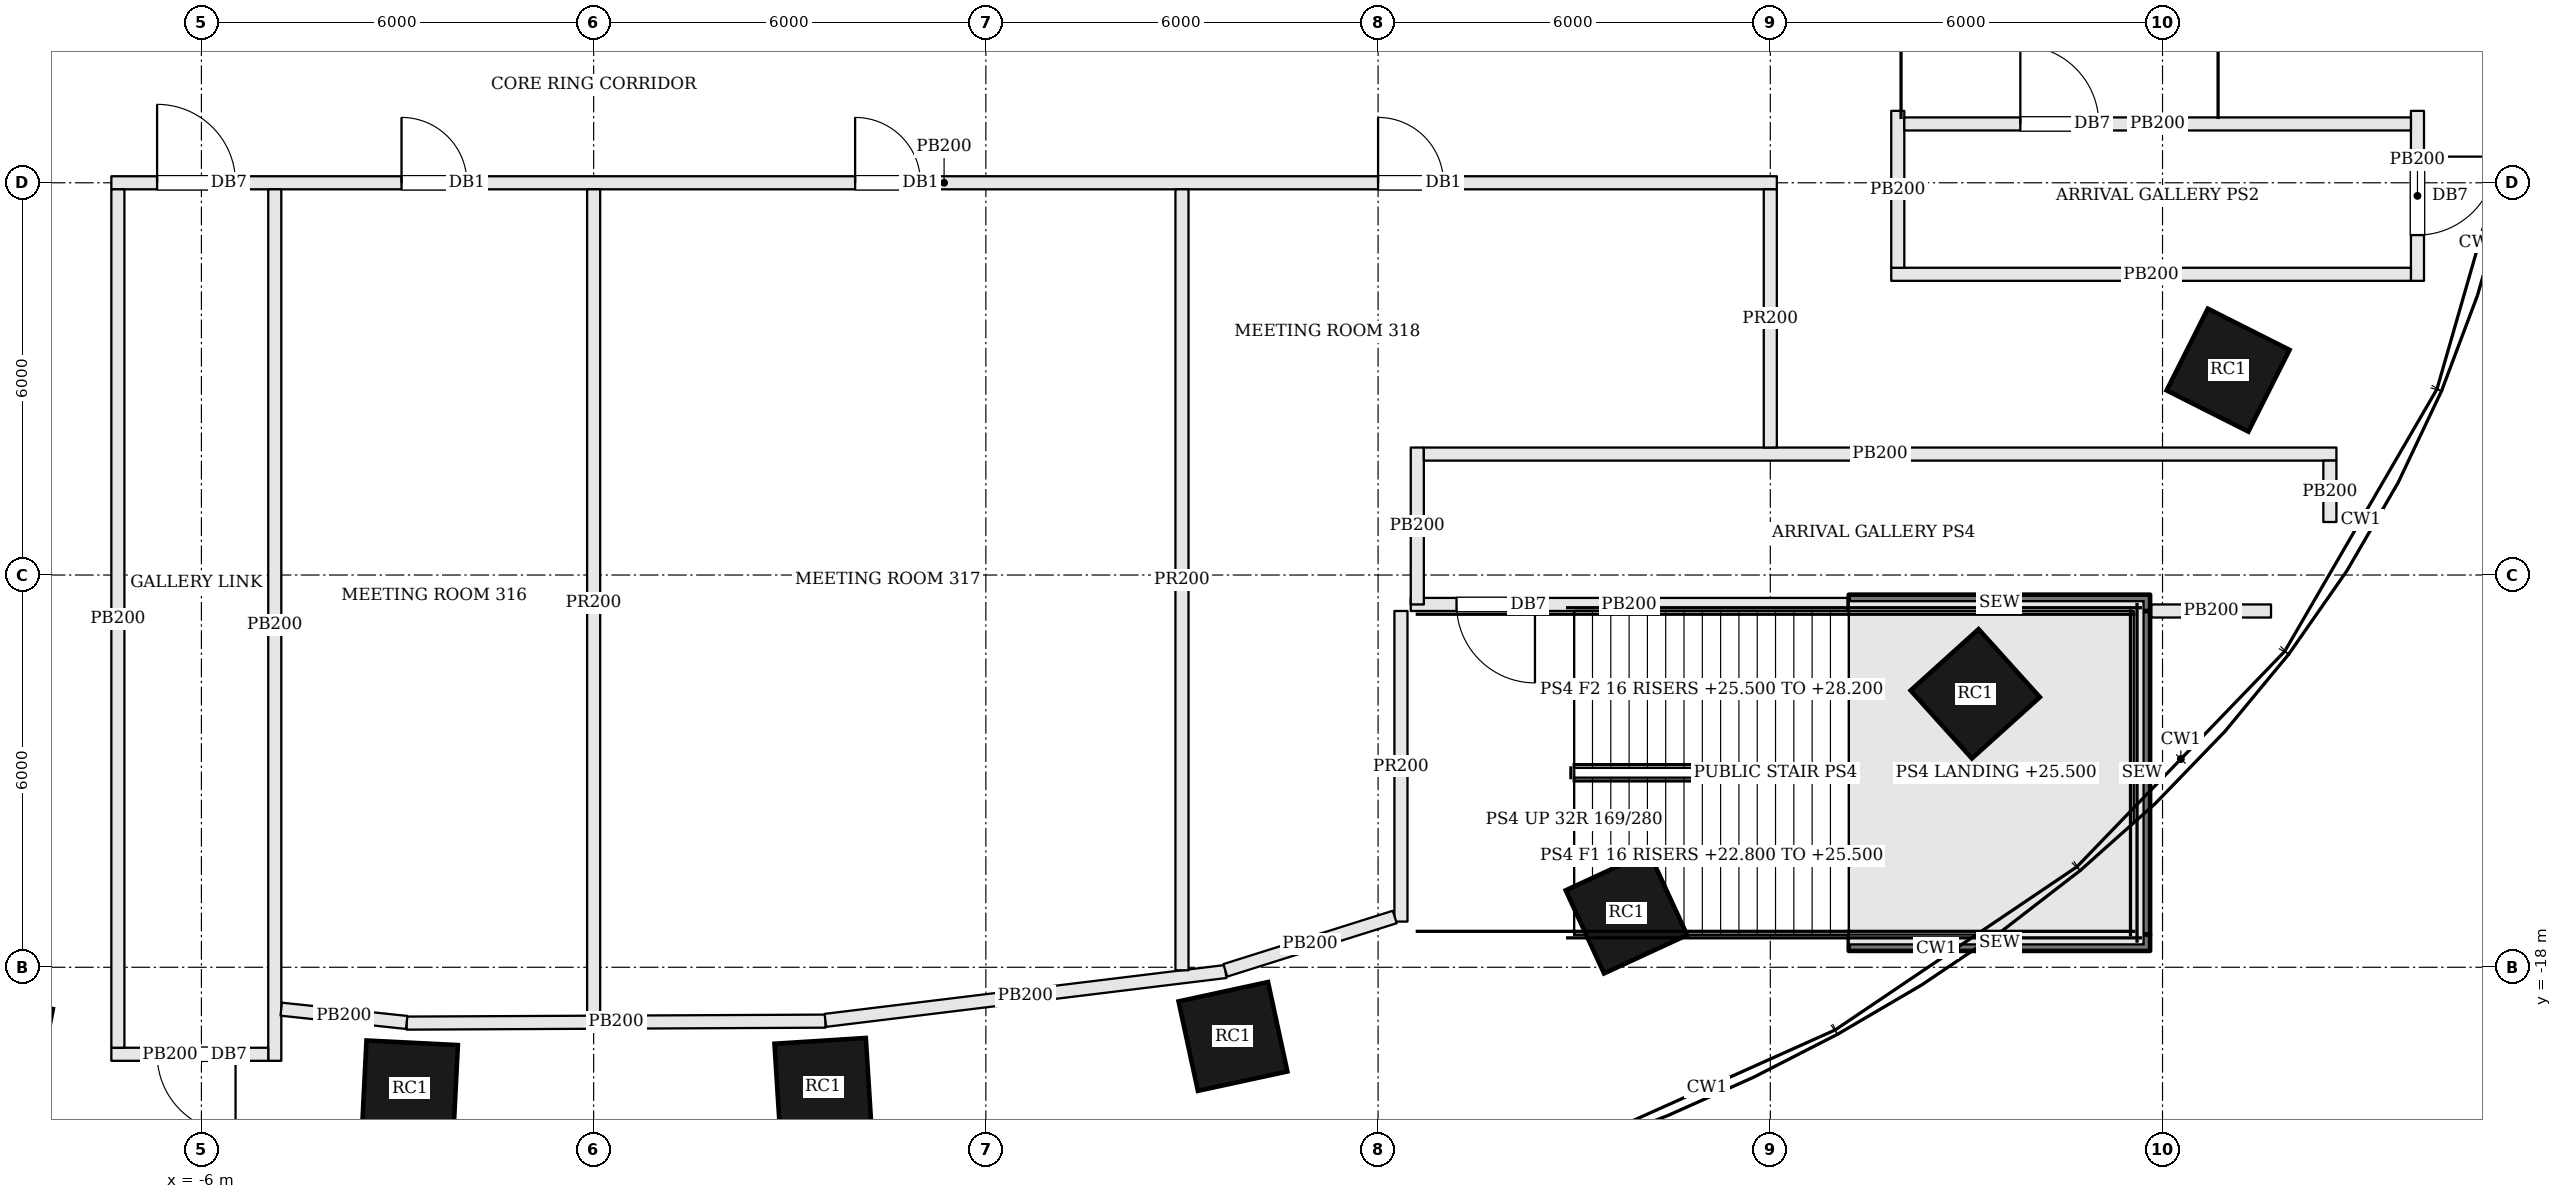
"""IFC4 building model, lengths in metres.
Left out: names, types, materials, properties, quantities, classifications, styles, units other than length and angle.
Written with IfcOpenShell. Run it as: python <this file> out.ifc"""

import sys

from ifc_helpers import new_model, si_unit, direction, frame, frame_2d, origin, origin_2d, place, context, subcontext, project, spatial, rectangle, extrude, element, fill, save


model = new_model("IFC4")
c1 = context("Model", 3, precision=1e-05, world=origin(), true_north=direction((0.0, 1.0)))
c2 = subcontext(c1, "Body", "Model", "MODEL_VIEW")
j1 = project(units=[si_unit("LENGTHUNIT", "METRE"), si_unit("PLANEANGLEUNIT", "RADIAN")], contexts=[c1])
p1 = place(None, origin())
s1 = spatial("IfcSite", under=j1, at=p1, CompositionType="ELEMENT")
p2 = place(p1, origin())
s2 = spatial("IfcBuilding", under=s1, at=p2, CompositionType="ELEMENT")
p3 = place(p2, frame((0.0, 0.0, 22.8)))
s3 = spatial("IfcBuildingStorey", under=s2, at=p3, CompositionType="ELEMENT", Elevation=22.8)
for number, where, z_axis, x_axis in (
    (1, (-9.094, -19.192, 0.0), (0.0, 0.0, 1.0), (0.981, -0.192, 0.0)),
    (2, (-2.811, -19.854, 0.0), (0.0, 0.0, 1.0), (0.999, -0.05, 0.0)),
    (3, (3.509, -19.824, 0.0), (0.0, 0.0, 1.0), (0.998, 0.063, 0.0)),
    (4, (9.78, -19.058, 0.0), (0.0, 0.0, 1.0), (0.977, 0.211, 0.0)),
    (5, (15.799, -17.165, 0.0), (0.0, 0.0, 1.0), (0.908, 0.419, 0.0)),
    (6, (21.135, -13.817, 0.0), (0.0, 0.0, 1.0), (0.743, 0.67, 0.0)),
    (7, (25.003, -8.866, 0.0), (0.0, 0.0, 1.0), (0.45, 0.893, 0.0)),
):
    element("IfcColumn", number, at=place(p3, frame(where, z_axis=z_axis, x_axis=x_axis)), inside=s3, PredefinedType="COLUMN", context=c2, shape_type="SweptSolid", body=[
        extrude(rectangle(XDim=1.4, YDim=1.4, at=origin_2d()), origin(), (0.0, 0.0, 1.0), 5.4),
    ])
p4 = place(p3, frame((27.9, -4.9, 0.0), z_axis=(0.0, 0.0, 1.0), x_axis=(0.0, -1.0, 0.0)))
e8 = element("IfcWall", 8, at=p4, inside=s3, PredefinedType="PARTITIONING", context=c2, shape_type="SweptSolid", body=[
    extrude(rectangle(XDim=2.6, YDim=0.2, at=frame_2d((1.3, 0.0))), origin(), (0.0, 0.0, 1.0), 4.43),
])
p5 = place(p4, frame((0.7, 0.0, 0.0)))
e9 = element("IfcOpeningElement", 9, at=p5, cuts=e8, PredefinedType="OPENING", context=c2, shape_type="SweptSolid", body=[
    extrude(rectangle(XDim=1.2, YDim=2.1, at=frame_2d((0.6, 1.05))), frame((0.0, 0.11, 0.0), z_axis=(0.0, -1.0, 0.0), x_axis=(1.0, 0.0, 0.0)), (0.0, 0.0, 1.0), 0.22),
])
p6 = place(p3, frame((27.8, -7.4, 0.0), z_axis=(0.0, 0.0, 1.0), x_axis=(-1.0, 0.0, 0.0)))
e10 = element("IfcWall", 10, at=p6, inside=s3, PredefinedType="PARTITIONING", context=c2, shape_type="SweptSolid", body=[
    extrude(rectangle(XDim=7.95, YDim=0.2, at=frame_2d((3.975, 0.0))), origin(), (0.0, 0.0, 1.0), 4.43),
])
p7 = place(p3, frame((19.95, -7.3, 0.0), z_axis=(0.0, 0.0, 1.0), x_axis=(0.0, 1.0, 0.0)))
e11 = element("IfcWall", 11, at=p7, inside=s3, PredefinedType="PARTITIONING", context=c2, shape_type="SweptSolid", body=[
    extrude(rectangle(XDim=2.4, YDim=0.2, at=frame_2d((1.2, 0.0))), origin(), (0.0, 0.0, 1.0), 4.43),
])
p8 = place(p3, frame((20.05, -5.1, 0.0), z_axis=(0.0, 0.0, 1.0), x_axis=(1.0, 0.0, 0.0)))
e12 = element("IfcWall", 12, at=p8, inside=s3, PredefinedType="PARTITIONING", context=c2, shape_type="SweptSolid", body=[
    extrude(rectangle(XDim=7.75, YDim=0.2, at=frame_2d((3.875, 0.0))), origin(), (0.0, 0.0, 1.0), 4.43),
])
p9 = place(p8, frame((1.775, 0.0, 0.0)))
e13 = element("IfcOpeningElement", 13, at=p9, cuts=e12, PredefinedType="OPENING", context=c2, shape_type="SweptSolid", body=[
    extrude(rectangle(XDim=1.2, YDim=2.1, at=frame_2d((0.6, 1.05))), frame((0.0, 0.11, 0.0), z_axis=(0.0, -1.0, 0.0), x_axis=(1.0, 0.0, 0.0)), (0.0, 0.0, 1.0), 0.22),
])
p10 = place(p3, frame((25.66, -12.55, 0.0), z_axis=(0.0, 0.0, 1.0), x_axis=(-1.0, 0.0, 0.0)))
e14 = element("IfcWall", 14, at=p10, inside=s3, PredefinedType="PARTITIONING", context=c2, shape_type="SweptSolid", body=[
    extrude(rectangle(XDim=1.83, YDim=0.2, at=frame_2d((0.915, 0.0))), origin(), (0.0, 0.0, 1.0), 4.43),
])
p11 = place(p3, frame((19.18, -12.45, 0.0), z_axis=(0.0, 0.0, 1.0), x_axis=(-1.0, 0.0, 0.0)))
e15 = element("IfcWall", 15, at=p11, inside=s3, PredefinedType="PARTITIONING", context=c2, shape_type="SweptSolid", body=[
    extrude(rectangle(XDim=6.68, YDim=0.2, at=frame_2d((3.34, 0.0))), origin(), (0.0, 0.0, 1.0), 4.43),
])
p12 = place(p11, frame((4.78, 0.0, 0.0)))
e16 = element("IfcOpeningElement", 16, at=p12, cuts=e15, PredefinedType="OPENING", context=c2, shape_type="SweptSolid", body=[
    extrude(rectangle(XDim=1.2, YDim=2.1, at=frame_2d((0.6, 1.05))), frame((0.0, 0.11, 0.0), z_axis=(0.0, -1.0, 0.0), x_axis=(1.0, 0.0, 0.0)), (0.0, 0.0, 1.0), 0.22),
])
p13 = place(p3, frame((12.6, -12.45, 0.0), z_axis=(0.0, 0.0, 1.0), x_axis=(0.0, 1.0, 0.0)))
e17 = element("IfcWall", 17, at=p13, inside=s3, PredefinedType="PARTITIONING", context=c2, shape_type="SweptSolid", body=[
    extrude(rectangle(XDim=2.4, YDim=0.2, at=frame_2d((1.2, 0.0))), origin(), (0.0, 0.0, 1.0), 4.43),
])
p14 = place(p3, frame((12.7, -10.15, 0.0), z_axis=(0.0, 0.0, 1.0), x_axis=(1.0, 0.0, 0.0)))
e18 = element("IfcWall", 18, at=p14, inside=s3, PredefinedType="PARTITIONING", context=c2, shape_type="SweptSolid", body=[
    extrude(rectangle(XDim=13.96, YDim=0.2, at=frame_2d((6.98, 0.0))), origin(), (0.0, 0.0, 1.0), 4.43),
])
p15 = place(p3, frame((26.56, -10.25, 0.0), z_axis=(0.0, 0.0, 1.0), x_axis=(0.0, -1.0, 0.0)))
e19 = element("IfcWall", 19, at=p15, inside=s3, PredefinedType="PARTITIONING", context=c2, shape_type="SweptSolid", body=[
    extrude(rectangle(XDim=0.939, YDim=0.2, at=frame_2d((0.469, 0.0))), origin(), (0.0, 0.0, 1.0), 4.43),
])
p16 = place(p3, frame((-7.378, -6.0, 0.0), z_axis=(0.0, 0.0, 1.0), x_axis=(1.0, 0.0, 0.0)))
e20 = element("IfcWall", 20, at=p16, inside=s3, PredefinedType="PARTITIONING", context=c2, shape_type="SweptSolid", body=[
    extrude(rectangle(XDim=25.478, YDim=0.2, at=frame_2d((12.739, 0.0))), origin(), (0.0, 0.0, 1.0), 4.43),
])
p17 = place(p16, frame((0.7, 0.0, 0.0)))
e21 = element("IfcOpeningElement", 21, at=p17, cuts=e20, PredefinedType="OPENING", context=c2, shape_type="SweptSolid", body=[
    extrude(rectangle(XDim=1.2, YDim=2.1, at=frame_2d((0.6, 1.05))), frame((0.0, 0.11, 0.0), z_axis=(0.0, -1.0, 0.0), x_axis=(1.0, 0.0, 0.0)), (0.0, 0.0, 1.0), 0.22),
])
p18 = place(p16, frame((4.439, 0.0, 0.0)))
e22 = element("IfcOpeningElement", 22, at=p18, cuts=e20, PredefinedType="OPENING", context=c2, shape_type="SweptSolid", body=[
    extrude(rectangle(XDim=1.0, YDim=2.1, at=frame_2d((0.5, 1.05))), frame((0.0, 0.11, 0.0), z_axis=(0.0, -1.0, 0.0), x_axis=(1.0, 0.0, 0.0)), (0.0, 0.0, 1.0), 0.22),
])
p19 = place(p16, frame((11.378, 0.0, 0.0)))
e23 = element("IfcOpeningElement", 23, at=p19, cuts=e20, PredefinedType="OPENING", context=c2, shape_type="SweptSolid", body=[
    extrude(rectangle(XDim=1.0, YDim=2.1, at=frame_2d((0.5, 1.05))), frame((0.0, 0.11, 0.0), z_axis=(0.0, -1.0, 0.0), x_axis=(1.0, 0.0, 0.0)), (0.0, 0.0, 1.0), 0.22),
])
p20 = place(p16, frame((19.378, 0.0, 0.0)))
e24 = element("IfcOpeningElement", 24, at=p20, cuts=e20, PredefinedType="OPENING", context=c2, shape_type="SweptSolid", body=[
    extrude(rectangle(XDim=1.0, YDim=2.1, at=frame_2d((0.5, 1.05))), frame((0.0, 0.11, 0.0), z_axis=(0.0, -1.0, 0.0), x_axis=(1.0, 0.0, 0.0)), (0.0, 0.0, 1.0), 0.22),
])
p21 = place(p3, frame((-4.878, -6.1, 0.0), z_axis=(0.0, 0.0, 1.0), x_axis=(0.0, -1.0, 0.0)))
e25 = element("IfcWall", 25, at=p21, inside=s3, PredefinedType="PARTITIONING", context=c2, shape_type="SweptSolid", body=[
    extrude(rectangle(XDim=13.331, YDim=0.2, at=frame_2d((6.666, 0.0))), origin(), (0.0, 0.0, 1.0), 4.43),
])
p22 = place(p3, frame((-4.978, -19.331, 0.0), z_axis=(0.0, 0.0, 1.0), x_axis=(-1.0, 0.0, 0.0)))
e26 = element("IfcWall", 26, at=p22, inside=s3, PredefinedType="PARTITIONING", context=c2, shape_type="SweptSolid", body=[
    extrude(rectangle(XDim=2.4, YDim=0.2, at=frame_2d((1.2, 0.0))), origin(), (0.0, 0.0, 1.0), 4.43),
])
p23 = place(p22, frame((0.5, 0.0, 0.0)))
e27 = element("IfcOpeningElement", 27, at=p23, cuts=e26, PredefinedType="OPENING", context=c2, shape_type="SweptSolid", body=[
    extrude(rectangle(XDim=1.2, YDim=2.1, at=frame_2d((0.6, 1.05))), frame((0.0, 0.11, 0.0), z_axis=(0.0, -1.0, 0.0), x_axis=(1.0, 0.0, 0.0)), (0.0, 0.0, 1.0), 0.22),
])
p24 = place(p3, frame((-7.278, -19.231, 0.0), z_axis=(0.0, 0.0, 1.0), x_axis=(0.0, 1.0, 0.0)))
e28 = element("IfcWall", 28, at=p24, inside=s3, PredefinedType="PARTITIONING", context=c2, shape_type="SweptSolid", body=[
    extrude(rectangle(XDim=13.131, YDim=0.2, at=frame_2d((6.565, 0.0))), origin(), (0.0, 0.0, 1.0), 4.43),
])
p25 = place(p3, frame((3.546, -18.824, 0.0), z_axis=(0.0, 0.0, 1.0), x_axis=(-0.999989016365, -0.004686912663, 0.0)))
e29 = element("IfcWall", 29, at=p25, inside=s3, PredefinedType="PARTITIONING", context=c2, shape_type="SweptSolid", body=[
    extrude(rectangle(XDim=6.407, YDim=0.2, at=frame_2d((3.204, 0.0))), origin(), (0.0, 0.0, 1.0), 4.43),
])
p26 = place(p3, frame((-2.86, -18.844, 0.0), z_axis=(0.0, 0.0, 1.0), x_axis=(-0.994457513639, 0.105139210412, 0.0)))
e30 = element("IfcWall", 30, at=p26, inside=s3, PredefinedType="PARTITIONING", context=c2, shape_type="SweptSolid", body=[
    extrude(rectangle(XDim=1.93, YDim=0.2, at=frame_2d((0.965, 0.0))), origin(), (0.0, 0.0, 1.0), 4.43),
])
p27 = place(p3, frame((0.0, -6.1, 0.0), z_axis=(0.0, 0.0, 1.0), x_axis=(0.0, -1.0, 0.0)))
e31 = element("IfcWall", 31, at=p27, inside=s3, PredefinedType="PARTITIONING", context=c2, shape_type="SweptSolid", body=[
    extrude(rectangle(XDim=12.641, YDim=0.2, at=frame_2d((6.32, 0.0))), origin(), (0.0, 0.0, 1.0), 4.43),
])
p28 = place(p3, frame((9.667, -18.065, 0.0), z_axis=(0.0, 0.0, 1.0), x_axis=(-0.992636593244, -0.121130482347, 0.0)))
e32 = element("IfcWall", 32, at=p28, inside=s3, PredefinedType="PARTITIONING", context=c2, shape_type="SweptSolid", body=[
    extrude(rectangle(XDim=6.167, YDim=0.2, at=frame_2d((3.084, 0.0))), origin(), (0.0, 0.0, 1.0), 4.43),
])
p29 = place(p3, frame((9.0, -6.1, 0.0), z_axis=(0.0, 0.0, 1.0), x_axis=(0.0, -1.0, 0.0)))
e33 = element("IfcWall", 33, at=p29, inside=s3, PredefinedType="PARTITIONING", context=c2, shape_type="SweptSolid", body=[
    extrude(rectangle(XDim=11.946, YDim=0.2, at=frame_2d((5.973, 0.0))), origin(), (0.0, 0.0, 1.0), 4.43),
])
p30 = place(p3, frame((18.0, -6.1, 0.0), z_axis=(0.0, 0.0, 1.0), x_axis=(0.0, -1.0, 0.0)))
e34 = element("IfcWall", 34, at=p30, inside=s3, PredefinedType="PARTITIONING", context=c2, shape_type="SweptSolid", body=[
    extrude(rectangle(XDim=3.95, YDim=0.2, at=frame_2d((1.975, 0.0))), origin(), (0.0, 0.0, 1.0), 4.43),
])
p31 = place(p3, frame((12.35, -12.55, 0.0), z_axis=(0.0, 0.0, 1.0), x_axis=(0.0, -1.0, 0.0)))
e35 = element("IfcWall", 35, at=p31, inside=s3, PredefinedType="PARTITIONING", context=c2, shape_type="SweptSolid", body=[
    extrude(rectangle(XDim=4.751, YDim=0.2, at=frame_2d((2.375, 0.0))), origin(), (0.0, 0.0, 1.0), 4.43),
])
p32 = place(p3, frame((12.255, -17.231, 0.0), z_axis=(0.0, 0.0, 1.0), x_axis=(-0.953825419117, -0.300361565195, 0.0)))
e36 = element("IfcWall", 36, at=p32, inside=s3, PredefinedType="PARTITIONING", context=c2, shape_type="SweptSolid", body=[
    extrude(rectangle(XDim=2.717, YDim=0.2, at=frame_2d((1.359, 0.0))), origin(), (0.0, 0.0, 1.0), 4.43),
])
p33 = place(p3, frame((23.685, -17.5, 0.0), z_axis=(0.0, 0.0, 1.0), x_axis=(0.0, 1.0, 0.0)))
e37 = element("IfcWall", 37, at=p33, inside=s3, PredefinedType="SOLIDWALL", context=c2, shape_type="SweptSolid", body=[
    extrude(rectangle(XDim=4.95, YDim=0.25, at=frame_2d((2.475, 0.0))), origin(), (0.0, 0.0, 1.0), 5.15),
])
for number, where, z_axis, x_axis in (
    (38, (19.2, -17.625, 0.0), (0.0, 0.0, 1.0), (1.0, 0.0, 0.0)),
    (39, (19.2, -12.425, 0.0), (0.0, 0.0, 1.0), (1.0, 0.0, 0.0)),
):
    element("IfcWall", number, at=place(p3, frame(where, z_axis=z_axis, x_axis=x_axis)), inside=s3, PredefinedType="SOLIDWALL", context=c2, shape_type="SweptSolid", body=[
        extrude(rectangle(XDim=4.61, YDim=0.25, at=frame_2d((2.305, 0.0))), origin(), (0.0, 0.0, 1.0), 5.15),
    ])
p34 = place(p17, origin())
e40 = element("IfcDoor", 40, at=p34, inside=s3, OperationType="SINGLE_SWING_LEFT", PredefinedType="DOOR", context=c2, shape_type="SweptSolid", body=[
    extrude(rectangle(XDim=1.2, YDim=2.1, at=frame_2d((0.6, 1.05))), frame((0.0, 0.025, 0.0), z_axis=(0.0, -1.0, 0.0), x_axis=(1.0, 0.0, 0.0)), (0.0, 0.0, 1.0), 0.05),
])
fill(e21, e40)
p35 = place(p23, origin())
e41 = element("IfcDoor", 41, at=p35, inside=s3, OperationType="SINGLE_SWING_LEFT", PredefinedType="DOOR", context=c2, shape_type="SweptSolid", body=[
    extrude(rectangle(XDim=1.2, YDim=2.1, at=frame_2d((0.6, 1.05))), frame((0.0, 0.025, 0.0), z_axis=(0.0, -1.0, 0.0), x_axis=(1.0, 0.0, 0.0)), (0.0, 0.0, 1.0), 0.05),
])
fill(e27, e41)
p36 = place(p9, origin())
e42 = element("IfcDoor", 42, at=p36, inside=s3, OperationType="SINGLE_SWING_LEFT", PredefinedType="DOOR", context=c2, shape_type="SweptSolid", body=[
    extrude(rectangle(XDim=1.2, YDim=2.1, at=frame_2d((0.6, 1.05))), frame((0.0, 0.025, 0.0), z_axis=(0.0, -1.0, 0.0), x_axis=(1.0, 0.0, 0.0)), (0.0, 0.0, 1.0), 0.05),
])
fill(e13, e42)
p37 = place(p5, origin())
e43 = element("IfcDoor", 43, at=p37, inside=s3, OperationType="SINGLE_SWING_LEFT", PredefinedType="DOOR", context=c2, shape_type="SweptSolid", body=[
    extrude(rectangle(XDim=1.2, YDim=2.1, at=frame_2d((0.6, 1.05))), frame((0.0, 0.025, 0.0), z_axis=(0.0, -1.0, 0.0), x_axis=(1.0, 0.0, 0.0)), (0.0, 0.0, 1.0), 0.05),
])
fill(e9, e43)
p38 = place(p12, origin())
e44 = element("IfcDoor", 44, at=p38, inside=s3, OperationType="SINGLE_SWING_LEFT", PredefinedType="DOOR", context=c2, shape_type="SweptSolid", body=[
    extrude(rectangle(XDim=1.2, YDim=2.1, at=frame_2d((0.6, 1.05))), frame((0.0, 0.025, 0.0), z_axis=(0.0, -1.0, 0.0), x_axis=(1.0, 0.0, 0.0)), (0.0, 0.0, 1.0), 0.05),
])
fill(e16, e44)
p39 = place(p18, origin())
e45 = element("IfcDoor", 45, at=p39, inside=s3, OperationType="SINGLE_SWING_LEFT", PredefinedType="DOOR", context=c2, shape_type="SweptSolid", body=[
    extrude(rectangle(XDim=1.0, YDim=2.1, at=frame_2d((0.5, 1.05))), frame((0.0, 0.025, 0.0), z_axis=(0.0, -1.0, 0.0), x_axis=(1.0, 0.0, 0.0)), (0.0, 0.0, 1.0), 0.05),
])
fill(e22, e45)
p40 = place(p19, origin())
e46 = element("IfcDoor", 46, at=p40, inside=s3, OperationType="SINGLE_SWING_LEFT", PredefinedType="DOOR", context=c2, shape_type="SweptSolid", body=[
    extrude(rectangle(XDim=1.0, YDim=2.1, at=frame_2d((0.5, 1.05))), frame((0.0, 0.025, 0.0), z_axis=(0.0, -1.0, 0.0), x_axis=(1.0, 0.0, 0.0)), (0.0, 0.0, 1.0), 0.05),
])
fill(e23, e46)
p41 = place(p20, origin())
e47 = element("IfcDoor", 47, at=p41, inside=s3, OperationType="SINGLE_SWING_LEFT", PredefinedType="DOOR", context=c2, shape_type="SweptSolid", body=[
    extrude(rectangle(XDim=1.0, YDim=2.1, at=frame_2d((0.5, 1.05))), frame((0.0, 0.025, 0.0), z_axis=(0.0, -1.0, 0.0), x_axis=(1.0, 0.0, 0.0)), (0.0, 0.0, 1.0), 0.05),
])
fill(e24, e47)
save(model, sys.argv[1])
